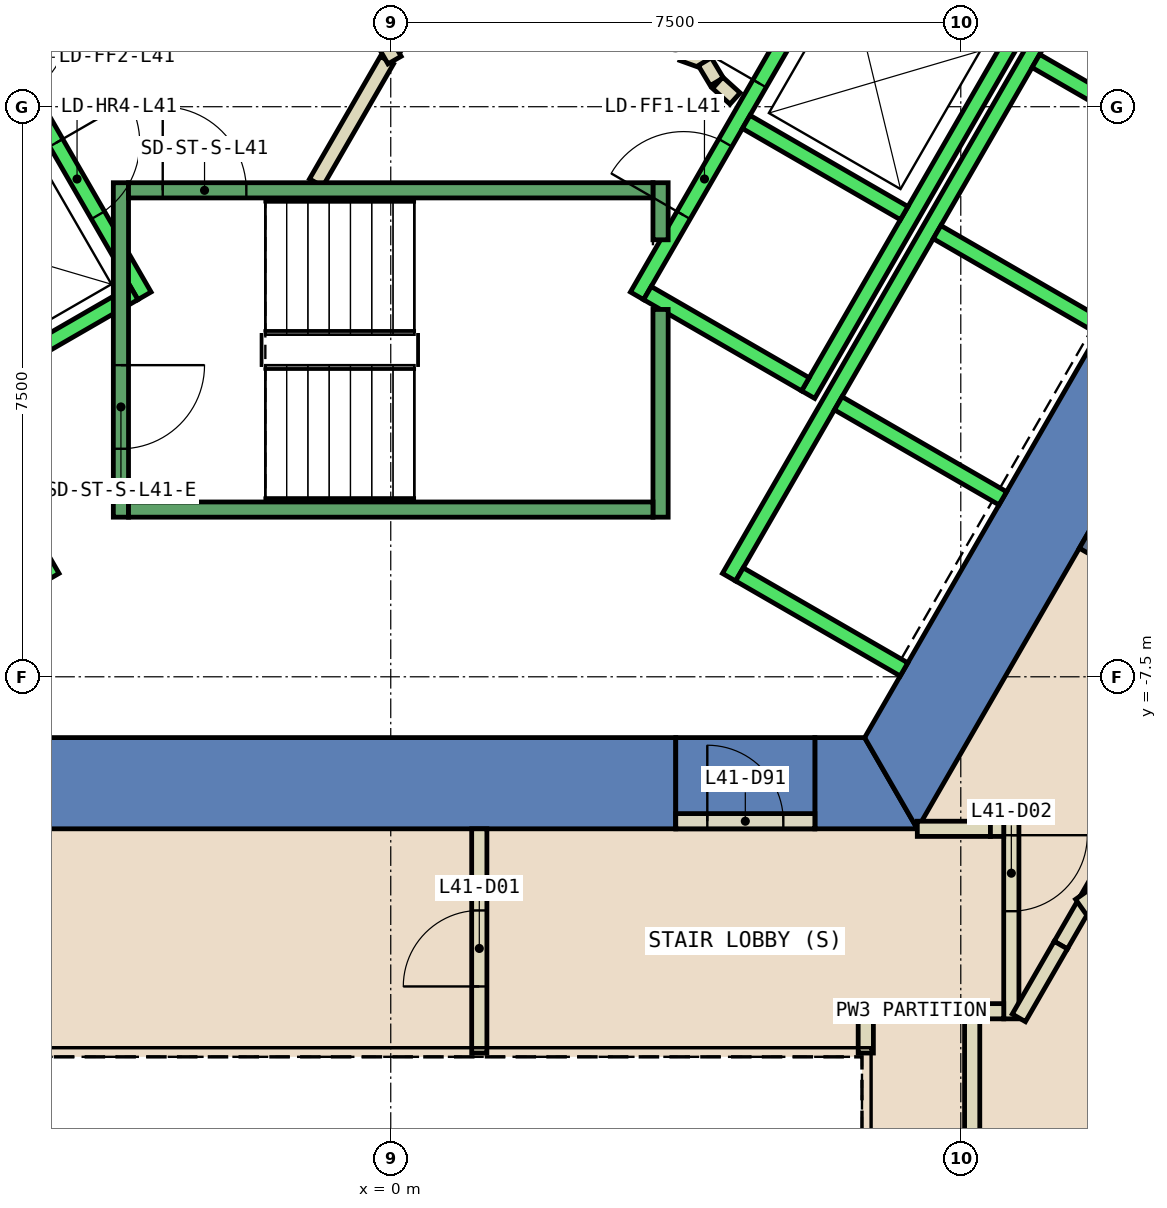
"""IFC4 building model, lengths in metres.
Left out: names, types, materials, properties, quantities, classifications, styles, units other than length and angle.
Written with IfcOpenShell. Run it as: python <this file> out.ifc"""

import sys

from ifc_helpers import new_model, si_unit, direction, frame, frame_2d, origin, place, context, subcontext, project, spatial, polyline, rectangle, outline, extrude, element, fill, save


model = new_model("IFC4")
c1 = context("Model", 3, precision=1e-05, world=origin(), true_north=direction((0.0, 1.0)))
c2 = subcontext(c1, "Body", "Model", "MODEL_VIEW")
j1 = project(units=[si_unit("LENGTHUNIT", "METRE"), si_unit("PLANEANGLEUNIT", "RADIAN")], contexts=[c1])
p1 = place(None, origin())
s1 = spatial("IfcSite", under=j1, at=p1, CompositionType="ELEMENT")
p2 = place(p1, origin())
s2 = spatial("IfcBuilding", under=s1, at=p2, CompositionType="ELEMENT")
p3 = place(p2, frame((0.0, 0.0, 184.4)))
s3 = spatial("IfcBuildingStorey", under=s2, at=p3, CompositionType="ELEMENT", Elevation=184.4)
p4 = place(p3, frame((0.0, 0.0, -0.6)))
e1 = element("IfcWall", 1, at=p4, inside=s3, PredefinedType="SHEAR", context=c2, shape_type="SweptSolid", body=[
    extrude(outline(polyline([(3.75, -9.5), (3.75, -8.3), (-6.235, -8.3), (-6.928, -9.5), (3.75, -9.5)])), origin(), (0.0, 0.0, 1.0), 5.4),
])
p5 = place(p3, frame((0.0, 0.0, -0.6)))
e2 = element("IfcWall", 2, at=p5, inside=s3, PredefinedType="SHEAR", context=c2, shape_type="SweptSolid", body=[
    extrude(outline(polyline([(5.58, -8.3), (5.58, -9.5), (6.928, -9.5), (6.235, -8.3), (5.58, -8.3)])), origin(), (0.0, 0.0, 1.0), 5.4),
])
p6 = place(p3, frame((0.0, 0.0, 3.6)))
e3 = element("IfcWall", 3, at=p6, inside=s3, PredefinedType="SHEAR", context=c2, shape_type="SweptSolid", body=[
    extrude(outline(polyline([(5.58, -9.5), (5.58, -8.3), (3.75, -8.3), (3.75, -9.5), (5.58, -9.5)])), origin(), (0.0, 0.0, 1.0), 1.2),
])
p7 = place(p3, frame((0.0, 0.0, -0.6)))
e4 = element("IfcWall", 4, at=p7, inside=s3, PredefinedType="SHEAR", context=c2, shape_type="SweptSolid", body=[
    extrude(outline(polyline([(6.928, -9.5), (13.856, 2.5), (12.471, 2.5), (6.235, -8.3), (6.928, -9.5)])), origin(), (0.0, 0.0, 1.0), 5.4),
])
p8 = place(p3, frame((9.31, -5.375, 0.0), z_axis=(0.0, 0.0, 1.0), x_axis=(0.866015103238, -0.500017840646, 0.0)))
e5 = element("IfcWall", 5, at=p8, inside=s3, PredefinedType="SHEAR", context=c2, shape_type="SweptSolid", body=[
    extrude(rectangle(XDim=27.139, YDim=1.0, at=frame_2d((13.57, 0.0))), origin(), (0.0, 0.0, 1.0), 4.8),
])
p9 = place(p3, frame((-0.982, -1.0, 0.0), z_axis=(0.0, 0.0, 1.0), x_axis=(0.50024047865, 0.865886518847, 0.0)))
e6 = element("IfcWall", 6, at=p9, inside=s3, PredefinedType="PARTITIONING", context=c2, shape_type="SweptSolid", body=[
    extrude(rectangle(XDim=1.863, YDim=0.2, at=frame_2d((0.931, 0.0))), origin(), (0.0, 0.0, 1.0), 4.8),
])
p10 = place(p3, frame((3.838, 0.702, 0.0), z_axis=(0.0, 0.0, 1.0), x_axis=(0.941035081519, -0.338308993895, 0.0)))
e7 = element("IfcWall", 7, at=p10, inside=s3, PredefinedType="PARTITIONING", context=c2, shape_type="SweptSolid", body=[
    extrude(rectangle(XDim=0.337, YDim=0.2, at=frame_2d((0.168, 0.0))), origin(), (0.0, 0.0, 1.0), 4.8),
])
p11 = place(p3, frame((4.132, 0.593, 0.0), z_axis=(0.0, 0.0, 1.0), x_axis=(0.513561617048, -0.858052717201, 0.0)))
e8 = element("IfcWall", 8, at=p11, inside=s3, PredefinedType="PARTITIONING", context=c2, shape_type="SweptSolid", body=[
    extrude(rectangle(XDim=0.308, YDim=0.2, at=frame_2d((0.154, 0.0))), origin(), (0.0, 0.0, 1.0), 4.8),
])
p12 = place(p3, frame((4.301, 0.315, 0.0), z_axis=(0.0, 0.0, 1.0), x_axis=(0.741798017506, -0.670623367639, 0.0)))
e9 = element("IfcWall", 9, at=p12, inside=s3, PredefinedType="PARTITIONING", context=c2, shape_type="SweptSolid", body=[
    extrude(rectangle(XDim=0.309, YDim=0.2, at=frame_2d((0.154, 0.0))), origin(), (0.0, 0.0, 1.0), 4.8),
])
p13 = place(p3, frame((-2.54, 5.1, 0.0), z_axis=(0.0, 0.0, 1.0), x_axis=(0.499925051871, -0.866068670783, 0.0)))
e10 = element("IfcWall", 10, at=p13, inside=s3, PredefinedType="PARTITIONING", context=c2, shape_type="SweptSolid", body=[
    extrude(rectangle(XDim=5.181, YDim=0.2, at=frame_2d((2.59, 0.0))), origin(), (0.0, 0.0, 1.0), 4.8),
])
p14 = place(p13, frame((2.04, 0.0, 0.0)))
e11 = element("IfcOpeningElement", 11, at=p14, cuts=e10, PredefinedType="OPENING", context=c2, shape_type="SweptSolid", body=[
    extrude(rectangle(XDim=1.0, YDim=2.1, at=frame_2d((0.5, 1.05))), frame((0.0, 0.11, 0.0), z_axis=(0.0, -1.0, 0.0), x_axis=(1.0, 0.0, 0.0)), (0.0, 0.0, 1.0), 0.22),
])
p15 = place(p3, frame((1.165, -12.45, 0.0), z_axis=(0.0, 0.0, 1.0), x_axis=(0.0, 1.0, 0.0)))
e12 = element("IfcWall", 12, at=p15, inside=s3, PredefinedType="PARTITIONING", context=c2, shape_type="SweptSolid", body=[
    extrude(rectangle(XDim=2.95, YDim=0.2, at=frame_2d((1.475, 0.0))), origin(), (0.0, 0.0, 1.0), 4.8),
])
p16 = place(p15, frame((0.876, 0.0, 0.0)))
e13 = element("IfcOpeningElement", 13, at=p16, cuts=e12, PredefinedType="OPENING", context=c2, shape_type="SweptSolid", body=[
    extrude(rectangle(XDim=1.0, YDim=2.1, at=frame_2d((0.5, 1.05))), frame((0.0, 0.11, 0.0), z_axis=(0.0, -1.0, 0.0), x_axis=(1.0, 0.0, 0.0)), (0.0, 0.0, 1.0), 0.22),
])
p17 = place(p3, frame((7.55, -11.9, 0.0), z_axis=(0.0, 0.0, 1.0), x_axis=(-1.0, 0.0, 0.0)))
e14 = element("IfcWall", 14, at=p17, inside=s3, PredefinedType="PARTITIONING", context=c2, shape_type="SweptSolid", body=[
    extrude(rectangle(XDim=1.399, YDim=0.2, at=frame_2d((0.7, 0.0))), origin(), (0.0, 0.0, 1.0), 4.8),
])
p18 = place(p3, frame((6.25, -12.0, 0.0), z_axis=(0.0, 0.0, 1.0), x_axis=(0.0, -1.0, 0.0)))
e15 = element("IfcWall", 15, at=p18, inside=s3, PredefinedType="PARTITIONING", context=c2, shape_type="SweptSolid", body=[
    extrude(rectangle(XDim=0.45, YDim=0.2, at=frame_2d((0.225, 0.0))), origin(), (0.0, 0.0, 1.0), 4.8),
])
p19 = place(p3, frame((6.928, -9.5, 0.0), z_axis=(0.0, 0.0, 1.0), x_axis=(1.0, 0.0, 0.0)))
e16 = element("IfcWall", 16, at=p19, inside=s3, PredefinedType="PARTITIONING", context=c2, shape_type="SweptSolid", body=[
    extrude(rectangle(XDim=0.962, YDim=0.2, at=frame_2d((0.481, 0.0))), origin(), (0.0, 0.0, 1.0), 2.4),
])
p20 = place(p3, frame((8.165, -9.4, 0.0), z_axis=(0.0, 0.0, 1.0), x_axis=(0.0, -1.0, 0.0)))
e17 = element("IfcWall", 17, at=p20, inside=s3, PredefinedType="PARTITIONING", context=c2, shape_type="SweptSolid", body=[
    extrude(rectangle(XDim=2.6, YDim=0.2, at=frame_2d((1.3, 0.0))), origin(), (0.0, 0.0, 1.0), 4.8),
])
p21 = place(p20, frame((0.184, 0.0, 0.0)))
e18 = element("IfcOpeningElement", 18, at=p21, cuts=e17, PredefinedType="OPENING", context=c2, shape_type="SweptSolid", body=[
    extrude(rectangle(XDim=1.0, YDim=2.1, at=frame_2d((0.5, 1.05))), frame((0.0, 0.11, 0.0), z_axis=(0.0, -1.0, 0.0), x_axis=(1.0, 0.0, 0.0)), (0.0, 0.0, 1.0), 0.22),
])
p22 = place(p3, frame((8.065, -11.9, 0.0), z_axis=(0.0, 0.0, 1.0), x_axis=(-1.0, 0.0, 0.0)))
e19 = element("IfcWall", 19, at=p22, inside=s3, PredefinedType="PARTITIONING", context=c2, shape_type="SweptSolid", body=[
    extrude(rectangle(XDim=0.315, YDim=0.2, at=frame_2d((0.157, 0.0))), origin(), (0.0, 0.0, 1.0), 4.8),
])
p23 = place(p3, frame((7.65, -11.8, 0.0), z_axis=(0.0, 0.0, 1.0), x_axis=(0.0, -1.0, 0.0)))
e20 = element("IfcWall", 20, at=p23, inside=s3, PredefinedType="PARTITIONING", context=c2, shape_type="SweptSolid", body=[
    extrude(rectangle(XDim=13.349, YDim=0.2, at=frame_2d((6.674, 0.0))), origin(), (0.0, 0.0, 1.0), 4.8),
])
p24 = place(p23, frame((6.867, 0.0, 0.0)))
e21 = element("IfcOpeningElement", 21, at=p24, cuts=e20, PredefinedType="OPENING", context=c2, shape_type="SweptSolid", body=[
    extrude(rectangle(XDim=1.0, YDim=2.1, at=frame_2d((0.5, 1.05))), frame((0.0, 0.11, 0.0), z_axis=(0.0, -1.0, 0.0), x_axis=(1.0, 0.0, 0.0)), (0.0, 0.0, 1.0), 0.22),
])
p25 = place(p3, frame((9.15, -10.451, 0.0), z_axis=(0.0, 0.0, 1.0), x_axis=(-0.499595985407, -0.8662585361, 0.0)))
e22 = element("IfcWall", 22, at=p25, inside=s3, PredefinedType="PARTITIONING", context=c2, shape_type="SweptSolid", body=[
    extrude(rectangle(XDim=0.668, YDim=0.2, at=frame_2d((0.334, 0.0))), origin(), (0.0, 0.0, 1.0), 4.8),
])
p26 = place(p3, frame((10.89, -7.437, 0.0), z_axis=(0.0, 0.0, 1.0), x_axis=(-0.499979528911, -0.866037222451, 0.0)))
e23 = element("IfcWall", 23, at=p26, inside=s3, PredefinedType="PARTITIONING", context=c2, shape_type="SweptSolid", body=[
    extrude(rectangle(XDim=3.48, YDim=0.2, at=frame_2d((1.74, 0.0))), origin(), (0.0, 0.0, 1.0), 4.8),
])
p27 = place(p26, frame((1.202, 0.0, 0.0)))
e24 = element("IfcOpeningElement", 24, at=p27, cuts=e23, PredefinedType="OPENING", context=c2, shape_type="SweptSolid", body=[
    extrude(rectangle(XDim=1.0, YDim=2.1, at=frame_2d((0.5, 1.05))), frame((0.0, 0.11, 0.0), z_axis=(0.0, -1.0, 0.0), x_axis=(1.0, 0.0, 0.0)), (0.0, 0.0, 1.0), 0.22),
])
p28 = place(p3, frame((9.092, -10.37, 0.0), z_axis=(0.0, 0.0, 1.0), x_axis=(0.57710323801, -0.816671202308, 0.0)))
e25 = element("IfcWall", 25, at=p28, inside=s3, PredefinedType="PARTITIONING", context=c2, shape_type="SweptSolid", body=[
    extrude(rectangle(XDim=19.393, YDim=0.2, at=frame_2d((9.697, 0.0))), origin(), (0.0, 0.0, 1.0), 4.8),
])
p29 = place(p3, frame((3.75, -9.4, 0.0), z_axis=(0.0, 0.0, 1.0), x_axis=(1.0, 0.0, 0.0)))
e26 = element("IfcWall", 26, at=p29, inside=s3, PredefinedType="PARTITIONING", context=c2, shape_type="SweptSolid", body=[
    extrude(rectangle(XDim=1.83, YDim=0.2, at=frame_2d((0.915, 0.0))), origin(), (0.0, 0.0, 1.0), 2.4),
])
p30 = place(p29, frame((0.415, 0.0, 0.0)))
e27 = element("IfcOpeningElement", 27, at=p30, cuts=e26, PredefinedType="OPENING", context=c2, shape_type="SweptSolid", body=[
    extrude(rectangle(XDim=1.0, YDim=2.1, at=frame_2d((0.5, 1.05))), frame((0.0, 0.11, 0.0), z_axis=(0.0, -1.0, 0.0), x_axis=(1.0, 0.0, 0.0)), (0.0, 0.0, 1.0), 0.22),
])
p31 = place(p3, frame((7.89, -9.5, 0.0), z_axis=(0.0, 0.0, 1.0), x_axis=(1.0, 0.0, 0.0)))
e28 = element("IfcWall", 28, at=p31, inside=s3, PredefinedType="PARTITIONING", context=c2, shape_type="SweptSolid", body=[
    extrude(rectangle(XDim=0.175, YDim=0.2, at=frame_2d((0.087, 0.0))), origin(), (0.0, 0.0, 1.0), 4.8),
])
p32 = place(p3, frame((8.816, -11.03, 0.0), z_axis=(0.0, 0.0, 1.0), x_axis=(-0.499633176362, -0.866237085952, 0.0)))
e29 = element("IfcWall", 29, at=p32, inside=s3, PredefinedType="PARTITIONING", context=c2, shape_type="SweptSolid", body=[
    extrude(rectangle(XDim=1.105, YDim=0.2, at=frame_2d((0.552, 0.0))), origin(), (0.0, 0.0, 1.0), 2.4),
])
p33 = place(p3, frame((-5.94, 2.188, 0.0), z_axis=(0.0, 0.0, 1.0), x_axis=(0.500034260056, -0.866005622828, 0.0)))
e30 = element("IfcWall", 30, at=p33, inside=s3, PredefinedType="STANDARD", context=c2, shape_type="SweptSolid", body=[
    extrude(rectangle(XDim=5.399, YDim=0.2, at=frame_2d((2.7, 0.0))), origin(), (0.0, 0.0, 1.0), 4.8),
])
p34 = place(p33, frame((3.075, 0.0, 0.0)))
e31 = element("IfcOpeningElement", 31, at=p34, cuts=e30, PredefinedType="OPENING", context=c2, shape_type="SweptSolid", body=[
    extrude(rectangle(XDim=1.1, YDim=2.1, at=frame_2d((0.55, 1.05))), frame((0.0, 0.11, 0.0), z_axis=(0.0, -1.0, 0.0), x_axis=(1.0, 0.0, 0.0)), (0.0, 0.0, 1.0), 0.22),
])
p35 = place(p33, frame((1.225, 0.0, 0.0)))
e32 = element("IfcOpeningElement", 32, at=p35, cuts=e30, PredefinedType="OPENING", context=c2, shape_type="SweptSolid", body=[
    extrude(rectangle(XDim=1.1, YDim=2.1, at=frame_2d((0.55, 1.05))), frame((0.0, 0.11, 0.0), z_axis=(0.0, -1.0, 0.0), x_axis=(1.0, 0.0, 0.0)), (0.0, 0.0, 1.0), 0.22),
])
p36 = place(p3, frame((-3.377, -2.452, 0.0), z_axis=(0.0, 0.0, 1.0), x_axis=(-0.865955154139, -0.50012165622, 0.0)))
e33 = element("IfcWall", 33, at=p36, inside=s3, PredefinedType="STANDARD", context=c2, shape_type="SweptSolid", body=[
    extrude(rectangle(XDim=2.4, YDim=0.2, at=frame_2d((1.2, 0.0))), origin(), (0.0, 0.0, 1.0), 4.8),
])
p37 = place(p3, frame((-9.751, 2.99, 0.0), z_axis=(0.0, 0.0, 1.0), x_axis=(0.50000090737, -0.866024879913, 0.0)))
e34 = element("IfcWall", 34, at=p37, inside=s3, PredefinedType="STANDARD", context=c2, shape_type="SweptSolid", body=[
    extrude(rectangle(XDim=10.6, YDim=0.2, at=frame_2d((5.3, 0.0))), origin(), (0.0, 0.0, 1.0), 4.8),
])
p38 = place(p3, frame((3.24, -2.488, 0.0), z_axis=(0.0, 0.0, 1.0), x_axis=(0.500034260056, 0.866005622828, 0.0)))
e35 = element("IfcWall", 35, at=p38, inside=s3, PredefinedType="STANDARD", context=c2, shape_type="SweptSolid", body=[
    extrude(rectangle(XDim=5.399, YDim=0.2, at=frame_2d((2.7, 0.0))), origin(), (0.0, 0.0, 1.0), 4.8),
])
p39 = place(p38, frame((3.225, 0.0, 0.0)))
e36 = element("IfcOpeningElement", 36, at=p39, cuts=e35, PredefinedType="OPENING", context=c2, shape_type="SweptSolid", body=[
    extrude(rectangle(XDim=1.1, YDim=2.1, at=frame_2d((0.55, 1.05))), frame((0.0, 0.11, 0.0), z_axis=(0.0, -1.0, 0.0), x_axis=(1.0, 0.0, 0.0)), (0.0, 0.0, 1.0), 0.22),
])
p40 = place(p38, frame((1.225, 0.0, 0.0)))
e37 = element("IfcOpeningElement", 37, at=p40, cuts=e35, PredefinedType="OPENING", context=c2, shape_type="SweptSolid", body=[
    extrude(rectangle(XDim=1.1, YDim=2.1, at=frame_2d((0.55, 1.05))), frame((0.0, 0.11, 0.0), z_axis=(0.0, -1.0, 0.0), x_axis=(1.0, 0.0, 0.0)), (0.0, 0.0, 1.0), 0.22),
])
p41 = place(p3, frame((5.492, -3.788, 0.0), z_axis=(0.0, 0.0, 1.0), x_axis=(0.500034260056, 0.866005622828, 0.0)))
e38 = element("IfcWall", 38, at=p41, inside=s3, PredefinedType="STANDARD", context=c2, shape_type="SweptSolid", body=[
    extrude(rectangle(XDim=5.399, YDim=0.2, at=frame_2d((2.7, 0.0))), origin(), (0.0, 0.0, 1.0), 4.8),
])
p42 = place(p3, frame((3.377, -2.452, 0.0), z_axis=(0.0, 0.0, 1.0), x_axis=(0.865955154139, -0.50012165622, 0.0)))
e39 = element("IfcWall", 39, at=p42, inside=s3, PredefinedType="STANDARD", context=c2, shape_type="SweptSolid", body=[
    extrude(rectangle(XDim=2.4, YDim=0.2, at=frame_2d((1.2, 0.0))), origin(), (0.0, 0.0, 1.0), 4.8),
])
p43 = place(p3, frame((4.677, -0.2, 0.0), z_axis=(0.0, 0.0, 1.0), x_axis=(0.865973769406, -0.500089422704, 0.0)))
e40 = element("IfcWall", 40, at=p43, inside=s3, PredefinedType="STANDARD", context=c2, shape_type="SweptSolid", body=[
    extrude(rectangle(XDim=2.399, YDim=0.2, at=frame_2d((1.2, 0.0))), origin(), (0.0, 0.0, 1.0), 4.8),
])
p44 = place(p3, frame((4.451, -6.19, 0.0), z_axis=(0.0, 0.0, 1.0), x_axis=(0.50000090737, 0.866024879913, 0.0)))
e41 = element("IfcWall", 41, at=p44, inside=s3, PredefinedType="STANDARD", context=c2, shape_type="SweptSolid", body=[
    extrude(rectangle(XDim=10.6, YDim=0.2, at=frame_2d((5.3, 0.0))), origin(), (0.0, 0.0, 1.0), 4.8),
])
for number, where, z_axis, x_axis in (
    (42, (4.588, -6.153, 0.0), (0.0, 0.0, 1.0), (0.866, -0.5, 0.0)),
    (43, (5.888, -3.902, 0.0), (0.0, 0.0, 1.0), (0.866, -0.5, 0.0)),
    (44, (7.188, -1.65, 0.0), (0.0, 0.0, 1.0), (0.866, -0.5, 0.0)),
    (45, (8.488, 0.602, 0.0), (0.0, 0.0, 1.0), (0.866, -0.5, 0.0)),
):
    element("IfcWall", number, at=place(p3, frame(where, z_axis=z_axis, x_axis=x_axis)), inside=s3, PredefinedType="STANDARD", context=c2, shape_type="SweptSolid", body=[
        extrude(rectangle(XDim=2.5, YDim=0.2, at=frame_2d((1.25, 0.0))), origin(), (0.0, 0.0, 1.0), 4.8),
    ])
p45 = place(p3, frame((-3.55, -1.0, 0.0), z_axis=(0.0, 0.0, 1.0), x_axis=(0.0, -1.0, 0.0)))
e46 = element("IfcWall", 46, at=p45, inside=s3, PredefinedType="STANDARD", context=c2, shape_type="SweptSolid", body=[
    extrude(rectangle(XDim=4.4, YDim=0.2, at=frame_2d((2.2, 0.0))), origin(), (0.0, 0.0, 1.0), 4.8),
])
p46 = place(p45, frame((2.4, 0.0, 0.0)))
e47 = element("IfcOpeningElement", 47, at=p46, cuts=e46, PredefinedType="OPENING", context=c2, shape_type="SweptSolid", body=[
    extrude(rectangle(XDim=1.1, YDim=2.2, at=frame_2d((0.55, 1.1))), frame((0.0, 0.11, 0.0), z_axis=(0.0, -1.0, 0.0), x_axis=(1.0, 0.0, 0.0)), (0.0, 0.0, 1.0), 0.22),
])
p47 = place(p3, frame((3.55, -2.667, 0.0), z_axis=(0.0, 0.0, 1.0), x_axis=(0.0, -1.0, 0.0)))
e48 = element("IfcWall", 48, at=p47, inside=s3, PredefinedType="STANDARD", context=c2, shape_type="SweptSolid", body=[
    extrude(rectangle(XDim=2.733, YDim=0.2, at=frame_2d((1.366, 0.0))), origin(), (0.0, 0.0, 1.0), 4.8),
])
p48 = place(p3, frame((3.55, -1.0, 0.0), z_axis=(0.0, 0.0, 1.0), x_axis=(0.0, -1.0, 0.0)))
e49 = element("IfcWall", 49, at=p48, inside=s3, PredefinedType="STANDARD", context=c2, shape_type="SweptSolid", body=[
    extrude(rectangle(XDim=0.751, YDim=0.2, at=frame_2d((0.375, 0.0))), origin(), (0.0, 0.0, 1.0), 4.8),
])
p49 = place(p3, frame((-3.45, -1.1, 0.0), z_axis=(0.0, 0.0, 1.0), x_axis=(1.0, 0.0, 0.0)))
e50 = element("IfcWall", 50, at=p49, inside=s3, PredefinedType="STANDARD", context=c2, shape_type="SweptSolid", body=[
    extrude(rectangle(XDim=6.9, YDim=0.2, at=frame_2d((3.45, 0.0))), origin(), (0.0, 0.0, 1.0), 4.8),
])
p50 = place(p49, frame((0.45, 0.0, 0.0)))
e51 = element("IfcOpeningElement", 51, at=p50, cuts=e50, PredefinedType="OPENING", context=c2, shape_type="SweptSolid", body=[
    extrude(rectangle(XDim=1.1, YDim=2.2, at=frame_2d((0.55, 1.1))), frame((0.0, 0.11, 0.0), z_axis=(0.0, -1.0, 0.0), x_axis=(1.0, 0.0, 0.0)), (0.0, 0.0, 1.0), 0.22),
])
p51 = place(p3, frame((-3.45, -5.3, 0.0), z_axis=(0.0, 0.0, 1.0), x_axis=(1.0, 0.0, 0.0)))
e52 = element("IfcWall", 52, at=p51, inside=s3, PredefinedType="STANDARD", context=c2, shape_type="SweptSolid", body=[
    extrude(rectangle(XDim=6.9, YDim=0.2, at=frame_2d((3.45, 0.0))), origin(), (0.0, 0.0, 1.0), 4.8),
])
p52 = place(p16, origin())
e53 = element("IfcDoor", 53, at=p52, inside=s3, OperationType="SINGLE_SWING_LEFT", PredefinedType="DOOR", context=c2, shape_type="SweptSolid", body=[
    extrude(rectangle(XDim=1.0, YDim=2.1, at=frame_2d((0.5, 1.05))), frame((0.0, 0.025, 0.0), z_axis=(0.0, -1.0, 0.0), x_axis=(1.0, 0.0, 0.0)), (0.0, 0.0, 1.0), 0.05),
])
fill(e13, e53)
p53 = place(p21, origin())
e54 = element("IfcDoor", 54, at=p53, inside=s3, OperationType="SINGLE_SWING_RIGHT", PredefinedType="DOOR", context=c2, shape_type="SweptSolid", body=[
    extrude(rectangle(XDim=1.0, YDim=2.1, at=frame_2d((0.5, 1.05))), frame((0.0, 0.025, 0.0), z_axis=(0.0, -1.0, 0.0), x_axis=(1.0, 0.0, 0.0)), (0.0, 0.0, 1.0), 0.05),
])
fill(e18, e54)
p54 = place(p30, origin())
e55 = element("IfcDoor", 55, at=p54, inside=s3, OperationType="SINGLE_SWING_LEFT", PredefinedType="DOOR", context=c2, shape_type="SweptSolid", body=[
    extrude(rectangle(XDim=1.0, YDim=2.1, at=frame_2d((0.5, 1.05))), frame((0.0, 0.025, 0.0), z_axis=(0.0, -1.0, 0.0), x_axis=(1.0, 0.0, 0.0)), (0.0, 0.0, 1.0), 0.05),
])
fill(e27, e55)
p55 = place(p39, origin())
e56 = element("IfcDoor", 56, at=p55, inside=s3, OperationType="SLIDING_TO_LEFT", PredefinedType="DOOR", context=c2, shape_type="SweptSolid", body=[
    extrude(rectangle(XDim=1.1, YDim=2.1, at=frame_2d((0.55, 1.05))), frame((0.0, 0.025, 0.0), z_axis=(0.0, -1.0, 0.0), x_axis=(1.0, 0.0, 0.0)), (0.0, 0.0, 1.0), 0.05),
])
fill(e36, e56)
p56 = place(p34, origin())
e57 = element("IfcDoor", 57, at=p56, inside=s3, OperationType="SLIDING_TO_LEFT", PredefinedType="DOOR", context=c2, shape_type="SweptSolid", body=[
    extrude(rectangle(XDim=1.1, YDim=2.1, at=frame_2d((0.55, 1.05))), frame((0.0, 0.025, 0.0), z_axis=(0.0, -1.0, 0.0), x_axis=(1.0, 0.0, 0.0)), (0.0, 0.0, 1.0), 0.05),
])
fill(e31, e57)
p57 = place(p40, origin())
e58 = element("IfcDoor", 58, at=p57, inside=s3, OperationType="SLIDING_TO_LEFT", PredefinedType="DOOR", context=c2, shape_type="SweptSolid", body=[
    extrude(rectangle(XDim=1.1, YDim=2.1, at=frame_2d((0.55, 1.05))), frame((0.0, 0.025, 0.0), z_axis=(0.0, -1.0, 0.0), x_axis=(1.0, 0.0, 0.0)), (0.0, 0.0, 1.0), 0.05),
])
fill(e37, e58)
p58 = place(p50, origin())
e59 = element("IfcDoor", 59, at=p58, inside=s3, OperationType="SINGLE_SWING_LEFT", PredefinedType="DOOR", context=c2, shape_type="SweptSolid", body=[
    extrude(rectangle(XDim=1.1, YDim=2.2, at=frame_2d((0.55, 1.1))), frame((0.0, 0.025, 0.0), z_axis=(0.0, -1.0, 0.0), x_axis=(1.0, 0.0, 0.0)), (0.0, 0.0, 1.0), 0.05),
])
fill(e51, e59)
p59 = place(p46, origin())
e60 = element("IfcDoor", 60, at=p59, inside=s3, OperationType="SINGLE_SWING_LEFT", PredefinedType="DOOR", context=c2, shape_type="SweptSolid", body=[
    extrude(rectangle(XDim=1.1, YDim=2.2, at=frame_2d((0.55, 1.1))), frame((0.0, 0.025, 0.0), z_axis=(0.0, -1.0, 0.0), x_axis=(1.0, 0.0, 0.0)), (0.0, 0.0, 1.0), 0.05),
])
fill(e47, e60)
save(model, sys.argv[1])
